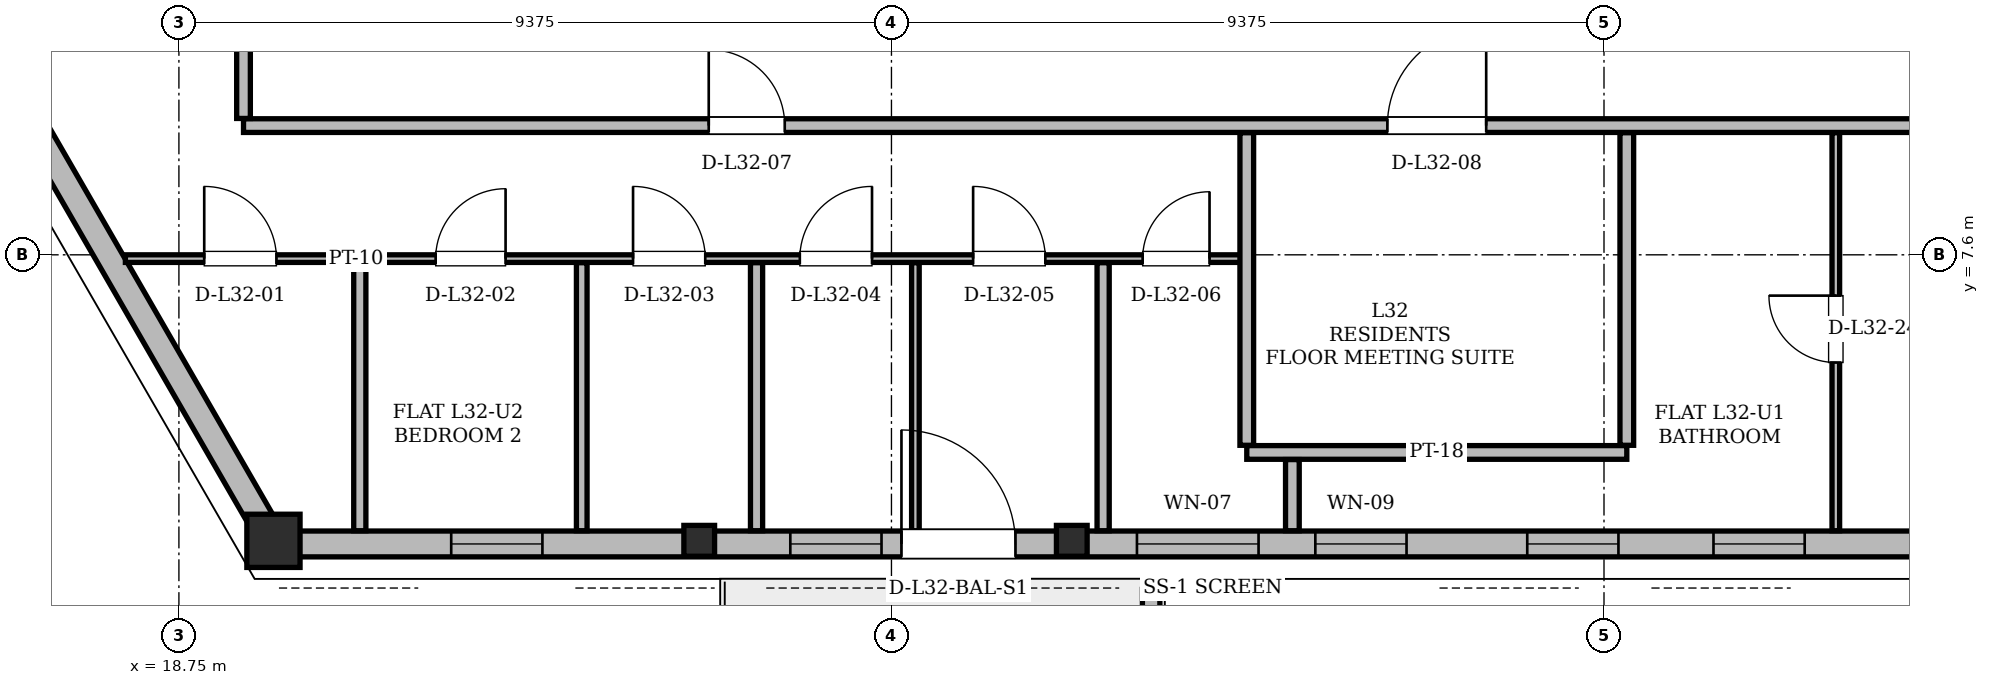
"""IFC4 building model, lengths in metres.
Left out: names, types, materials, properties, quantities, classifications, styles, units other than length and angle.
Written with IfcOpenShell. Run it as: python <this file> out.ifc"""

import sys

from ifc_helpers import new_model, si_unit, direction, frame, frame_2d, origin, origin_2d, place, context, subcontext, project, spatial, polyline, rectangle, hollow_rectangle, i_section, outline, extrude, element, fill, save


model = new_model("IFC4")
c1 = context("Model", 3, precision=1e-05, world=origin(), true_north=direction((0.0, 1.0)))
c2 = subcontext(c1, "Body", "Model", "MODEL_VIEW")
j1 = project(units=[si_unit("LENGTHUNIT", "METRE"), si_unit("PLANEANGLEUNIT", "RADIAN")], contexts=[c1])
p1 = place(None, origin())
s1 = spatial("IfcSite", under=j1, at=p1, CompositionType="ELEMENT")
p2 = place(p1, origin())
s2 = spatial("IfcBuilding", under=s1, at=p2, CompositionType="ELEMENT")
p3 = place(p2, frame((0.0, 0.0, 123.0)))
s3 = spatial("IfcBuildingStorey", under=s2, at=p3, CompositionType="ELEMENT", Elevation=123.0)
p4 = place(p3, frame((20.012, 3.796, 0.004), z_axis=(-0.010194632777, 0.022903941638, 0.999685690065), x_axis=(-0.913587827214, -0.406641466119, 0.0)))
e1 = element("IfcColumn", 1, at=p4, inside=s3, PredefinedType="COLUMN", context=c2, shape_type="SweptSolid", body=[
    extrude(hollow_rectangle(XDim=0.7, YDim=0.7, WallThickness=0.055, at=origin_2d()), origin(), (0.0, 0.0, 1.0), 3.592),
])
for number, where, z_axis, x_axis in (
    (2, (25.608, 3.796, 0.004), (-0.007, 0.023, 1.0), (-0.956, -0.292, 0.0)),
    (3, (30.505, 3.796, 0.004), (-0.004, 0.023, 1.0), (-0.985, -0.175, 0.0)),
):
    element("IfcColumn", number, at=place(p3, frame(where, z_axis=z_axis, x_axis=x_axis)), inside=s3, PredefinedType="COLUMN", context=c2, shape_type="SweptSolid", body=[
        extrude(i_section(OverallWidth=0.404, OverallDepth=0.406, WebThickness=0.027, FlangeThickness=0.044, at=origin_2d()), origin(), (0.0, 0.0, 1.0), 3.592),
    ])
p5 = place(p3, frame((14.636, 13.107, 0.0), z_axis=(0.0, 0.0, 1.0), x_axis=(0.500010095722, -0.866019574938, 0.0)))
e4 = element("IfcWall", 4, at=p5, inside=s3, PredefinedType="SOLIDWALL", context=c2, shape_type="SweptSolid", body=[
    extrude(rectangle(XDim=10.751, YDim=0.34, at=frame_2d((5.375, 0.0))), origin(), (0.0, 0.0, 1.0), 2.578),
])
p6 = place(p3, frame((20.012, 3.796, 0.0), z_axis=(0.0, 0.0, 1.0), x_axis=(1.0, 0.0, 0.0)))
e5 = element("IfcWall", 5, at=p6, inside=s3, PredefinedType="SOLIDWALL", context=c2, shape_type="SweptSolid", body=[
    extrude(rectangle(XDim=34.976, YDim=0.34, at=frame_2d((17.488, 0.0))), origin(), (0.0, 0.0, 1.0), 2.578),
])
p7 = place(p6, frame((8.244, 0.0, 0.0)))
e6 = element("IfcOpeningElement", 6, at=p7, cuts=e5, PredefinedType="OPENING", context=c2, shape_type="SweptSolid", body=[
    extrude(rectangle(XDim=1.5, YDim=2.2, at=frame_2d((0.75, 1.1))), frame((0.0, 0.17, 0.0), z_axis=(0.0, -1.0, 0.0), x_axis=(1.0, 0.0, 0.0)), (0.0, 0.0, 1.0), 0.34),
])
p8 = place(p6, frame((27.106, 0.0, 0.0)))
e7 = element("IfcOpeningElement", 7, at=p8, cuts=e5, PredefinedType="OPENING", context=c2, shape_type="SweptSolid", body=[
    extrude(rectangle(XDim=1.5, YDim=2.2, at=frame_2d((0.75, 1.1))), frame((0.0, 0.17, 0.0), z_axis=(0.0, -1.0, 0.0), x_axis=(1.0, 0.0, 0.0)), (0.0, 0.0, 1.0), 0.34),
])
p9 = place(p6, frame((13.69, 0.0, 0.85)))
e8 = element("IfcOpeningElement", 8, at=p9, cuts=e5, PredefinedType="OPENING", context=c2, shape_type="SweptSolid", body=[
    extrude(rectangle(XDim=1.2, YDim=1.48, at=frame_2d((0.6, 0.74))), frame((0.0, 0.17, 0.0), z_axis=(0.0, -1.0, 0.0), x_axis=(1.0, 0.0, 0.0)), (0.0, 0.0, 1.0), 0.34),
])
p10 = place(p6, frame((16.478, 0.0, 0.85)))
e9 = element("IfcOpeningElement", 9, at=p10, cuts=e5, PredefinedType="OPENING", context=c2, shape_type="SweptSolid", body=[
    extrude(rectangle(XDim=1.2, YDim=1.48, at=frame_2d((0.6, 0.74))), frame((0.0, 0.17, 0.0), z_axis=(0.0, -1.0, 0.0), x_axis=(1.0, 0.0, 0.0)), (0.0, 0.0, 1.0), 0.34),
])
p11 = place(p6, frame((22.323, 0.0, 0.85)))
e10 = element("IfcOpeningElement", 10, at=p11, cuts=e5, PredefinedType="OPENING", context=c2, shape_type="SweptSolid", body=[
    extrude(rectangle(XDim=1.2, YDim=1.48, at=frame_2d((0.6, 0.74))), frame((0.0, 0.17, 0.0), z_axis=(0.0, -1.0, 0.0), x_axis=(1.0, 0.0, 0.0)), (0.0, 0.0, 1.0), 0.34),
])
p12 = place(p6, frame((30.708, 0.0, 0.85)))
e11 = element("IfcOpeningElement", 11, at=p12, cuts=e5, PredefinedType="OPENING", context=c2, shape_type="SweptSolid", body=[
    extrude(rectangle(XDim=2.6, YDim=1.618, at=frame_2d((1.3, 0.809))), frame((0.0, 0.17, 0.0), z_axis=(0.0, -1.0, 0.0), x_axis=(1.0, 0.0, 0.0)), (0.0, 0.0, 1.0), 0.34),
])
p13 = place(p6, frame((18.928, 0.0, 0.85)))
e12 = element("IfcOpeningElement", 12, at=p13, cuts=e5, PredefinedType="OPENING", context=c2, shape_type="SweptSolid", body=[
    extrude(rectangle(XDim=1.2, YDim=1.48, at=frame_2d((0.6, 0.74))), frame((0.0, 0.17, 0.0), z_axis=(0.0, -1.0, 0.0), x_axis=(1.0, 0.0, 0.0)), (0.0, 0.0, 1.0), 0.34),
])
p14 = place(p6, frame((2.32, 0.0, 0.85)))
e13 = element("IfcOpeningElement", 13, at=p14, cuts=e5, PredefinedType="OPENING", context=c2, shape_type="SweptSolid", body=[
    extrude(rectangle(XDim=1.2, YDim=1.48, at=frame_2d((0.6, 0.74))), frame((0.0, 0.17, 0.0), z_axis=(0.0, -1.0, 0.0), x_axis=(1.0, 0.0, 0.0)), (0.0, 0.0, 1.0), 0.34),
])
p15 = place(p6, frame((6.782, 0.0, 0.85)))
e14 = element("IfcOpeningElement", 14, at=p15, cuts=e5, PredefinedType="OPENING", context=c2, shape_type="SweptSolid", body=[
    extrude(rectangle(XDim=1.2, YDim=1.48, at=frame_2d((0.6, 0.74))), frame((0.0, 0.17, 0.0), z_axis=(0.0, -1.0, 0.0), x_axis=(1.0, 0.0, 0.0)), (0.0, 0.0, 1.0), 0.34),
])
p16 = place(p6, frame((11.343, 0.0, 0.85)))
e15 = element("IfcOpeningElement", 15, at=p16, cuts=e5, PredefinedType="OPENING", context=c2, shape_type="SweptSolid", body=[
    extrude(rectangle(XDim=1.6, YDim=1.618, at=frame_2d((0.8, 0.809))), frame((0.0, 0.17, 0.0), z_axis=(0.0, -1.0, 0.0), x_axis=(1.0, 0.0, 0.0)), (0.0, 0.0, 1.0), 0.34),
])
p17 = place(p3, frame((31.542, 3.198, 0.0), z_axis=(0.0, 0.0, 1.0), x_axis=(0.0, -1.0, 0.0)))
e16 = element("IfcWall", 16, at=p17, inside=s3, PredefinedType="PARAPET", context=c2, shape_type="SweptSolid", body=[
    extrude(outline(polyline([(0.0, 0.0), (2.042, 0.0), (2.042, 1.1), (0.0, 1.32), (0.0, 0.0)])), frame((0.0, 0.115, 0.0), z_axis=(0.0, -1.0, 0.0), x_axis=(1.0, 0.0, 0.0)), (0.0, 0.0, 1.0), 0.23),
])
p18 = place(p3, frame((32.8, 5.0, 0.0), z_axis=(0.0, 0.0, 1.0), x_axis=(1.0, 0.0, 0.0)))
e17 = element("IfcWall", 17, at=p18, inside=s3, PredefinedType="PARTITIONING", context=c2, shape_type="SweptSolid", body=[
    extrude(rectangle(XDim=5.0, YDim=0.18, at=frame_2d((2.5, 0.0))), origin(), (0.0, 0.0, 1.0), 3.36),
])
p19 = place(p3, frame((18.046, 7.55, 0.0), z_axis=(0.0, 0.0, 1.0), x_axis=(1.0, 0.0, 0.0)))
e18 = element("IfcWall", 18, at=p19, inside=s3, PredefinedType="PARTITIONING", context=c2, shape_type="SweptSolid", body=[
    extrude(rectangle(XDim=14.804, YDim=0.1, at=frame_2d((7.402, 0.0))), origin(), (0.0, 0.0, 1.0), 2.814),
])
p20 = place(p19, frame((1.037, 0.0, 0.0)))
e19 = element("IfcOpeningElement", 19, at=p20, cuts=e18, PredefinedType="OPENING", context=c2, shape_type="SweptSolid", body=[
    extrude(rectangle(XDim=0.95, YDim=2.1, at=frame_2d((0.475, 1.05))), frame((0.0, 0.05, 0.0), z_axis=(0.0, -1.0, 0.0), x_axis=(1.0, 0.0, 0.0)), (0.0, 0.0, 1.0), 0.1),
])
p21 = place(p19, frame((4.082, 0.0, 0.0)))
e20 = element("IfcOpeningElement", 20, at=p21, cuts=e18, PredefinedType="OPENING", context=c2, shape_type="SweptSolid", body=[
    extrude(rectangle(XDim=0.92, YDim=2.12, at=frame_2d((0.46, 1.06))), frame((0.0, 0.05, 0.0), z_axis=(0.0, -1.0, 0.0), x_axis=(1.0, 0.0, 0.0)), (0.0, 0.0, 1.0), 0.1),
])
p22 = place(p19, frame((6.679, 0.0, 0.0)))
e21 = element("IfcOpeningElement", 21, at=p22, cuts=e18, PredefinedType="OPENING", context=c2, shape_type="SweptSolid", body=[
    extrude(rectangle(XDim=0.95, YDim=2.1, at=frame_2d((0.475, 1.05))), frame((0.0, 0.05, 0.0), z_axis=(0.0, -1.0, 0.0), x_axis=(1.0, 0.0, 0.0)), (0.0, 0.0, 1.0), 0.1),
])
p23 = place(p19, frame((8.873, 0.0, 0.0)))
e22 = element("IfcOpeningElement", 22, at=p23, cuts=e18, PredefinedType="OPENING", context=c2, shape_type="SweptSolid", body=[
    extrude(rectangle(XDim=0.95, YDim=2.1, at=frame_2d((0.475, 1.05))), frame((0.0, 0.05, 0.0), z_axis=(0.0, -1.0, 0.0), x_axis=(1.0, 0.0, 0.0)), (0.0, 0.0, 1.0), 0.1),
])
p24 = place(p19, frame((11.154, 0.0, 0.0)))
e23 = element("IfcOpeningElement", 23, at=p24, cuts=e18, PredefinedType="OPENING", context=c2, shape_type="SweptSolid", body=[
    extrude(rectangle(XDim=0.95, YDim=2.1, at=frame_2d((0.475, 1.05))), frame((0.0, 0.05, 0.0), z_axis=(0.0, -1.0, 0.0), x_axis=(1.0, 0.0, 0.0)), (0.0, 0.0, 1.0), 0.1),
])
p25 = place(p19, frame((13.384, 0.0, 0.0)))
e24 = element("IfcOpeningElement", 24, at=p25, cuts=e18, PredefinedType="OPENING", context=c2, shape_type="SweptSolid", body=[
    extrude(rectangle(XDim=0.88, YDim=2.08, at=frame_2d((0.44, 1.04))), frame((0.0, 0.05, 0.0), z_axis=(0.0, -1.0, 0.0), x_axis=(1.0, 0.0, 0.0)), (0.0, 0.0, 1.0), 0.1),
])
p26 = place(p3, frame((19.6, 9.3, 0.0), z_axis=(0.0, 0.0, 1.0), x_axis=(1.0, 0.0, 0.0)))
e25 = element("IfcWall", 25, at=p26, inside=s3, PredefinedType="PARTITIONING", context=c2, shape_type="SweptSolid", body=[
    extrude(rectangle(XDim=30.4, YDim=0.18, at=frame_2d((15.2, 0.0))), origin(), (0.0, 0.0, 1.0), 2.814),
])
p27 = place(p26, frame((6.121, 0.0, 0.0)))
e26 = element("IfcOpeningElement", 26, at=p27, cuts=e25, PredefinedType="OPENING", context=c2, shape_type="SweptSolid", body=[
    extrude(rectangle(XDim=1.0, YDim=2.18, at=frame_2d((0.5, 1.09))), frame((0.0, 0.09, 0.0), z_axis=(0.0, -1.0, 0.0), x_axis=(1.0, 0.0, 0.0)), (0.0, 0.0, 1.0), 0.18),
])
p28 = place(p26, frame((15.05, 0.0, 0.0)))
e27 = element("IfcOpeningElement", 27, at=p28, cuts=e25, PredefinedType="OPENING", context=c2, shape_type="SweptSolid", body=[
    extrude(rectangle(XDim=1.3, YDim=2.2, at=frame_2d((0.65, 1.1))), frame((0.0, 0.09, 0.0), z_axis=(0.0, -1.0, 0.0), x_axis=(1.0, 0.0, 0.0)), (0.0, 0.0, 1.0), 0.18),
])
p29 = place(p26, frame((24.633, 0.0, 0.0)))
e28 = element("IfcOpeningElement", 28, at=p29, cuts=e25, PredefinedType="OPENING", context=c2, shape_type="SweptSolid", body=[
    extrude(rectangle(XDim=1.0, YDim=2.18, at=frame_2d((0.5, 1.09))), frame((0.0, 0.09, 0.0), z_axis=(0.0, -1.0, 0.0), x_axis=(1.0, 0.0, 0.0)), (0.0, 0.0, 1.0), 0.18),
])
p30 = place(p3, frame((19.6, 9.394, 0.0), z_axis=(0.0, 0.0, 1.0), x_axis=(0.0, 1.0, 0.0)))
e29 = element("IfcWall", 29, at=p30, inside=s3, PredefinedType="PARTITIONING", context=c2, shape_type="SweptSolid", body=[
    extrude(rectangle(XDim=1.462, YDim=0.18, at=frame_2d((0.731, 0.0))), origin(), (0.0, 0.0, 1.0), 3.36),
])
p31 = place(p3, frame((21.13, 3.97, 0.0), z_axis=(0.0, 0.0, 1.0), x_axis=(0.0, 1.0, 0.0)))
e30 = element("IfcWall", 30, at=p31, inside=s3, PredefinedType="PARTITIONING", context=c2, shape_type="SweptSolid", body=[
    extrude(rectangle(XDim=3.526, YDim=0.16, at=frame_2d((1.763, 0.0))), origin(), (0.0, 0.0, 1.0), 2.814),
])
p32 = place(p3, frame((24.05, 3.97, 0.0), z_axis=(0.0, 0.0, 1.0), x_axis=(0.0, 1.0, 0.0)))
e31 = element("IfcWall", 31, at=p32, inside=s3, PredefinedType="PARTITIONING", context=c2, shape_type="SweptSolid", body=[
    extrude(rectangle(XDim=3.526, YDim=0.14, at=frame_2d((1.763, 0.0))), origin(), (0.0, 0.0, 1.0), 2.814),
])
p33 = place(p3, frame((26.35, 3.97, 0.0), z_axis=(0.0, 0.0, 1.0), x_axis=(0.0, 1.0, 0.0)))
e32 = element("IfcWall", 32, at=p33, inside=s3, PredefinedType="PARTITIONING", context=c2, shape_type="SweptSolid", body=[
    extrude(rectangle(XDim=3.526, YDim=0.16, at=frame_2d((1.763, 0.0))), origin(), (0.0, 0.0, 1.0), 2.946),
])
p34 = place(p3, frame((28.44, 3.97, 0.0), z_axis=(0.0, 0.0, 1.0), x_axis=(0.0, 1.0, 0.0)))
e33 = element("IfcWall", 33, at=p34, inside=s3, PredefinedType="PARTITIONING", context=c2, shape_type="SweptSolid", body=[
    extrude(rectangle(XDim=3.526, YDim=0.1, at=frame_2d((1.763, 0.0))), origin(), (0.0, 0.0, 1.0), 3.36),
])
p35 = place(p3, frame((30.91, 3.97, 0.0), z_axis=(0.0, 0.0, 1.0), x_axis=(0.0, 1.0, 0.0)))
e34 = element("IfcWall", 34, at=p35, inside=s3, PredefinedType="PARTITIONING", context=c2, shape_type="SweptSolid", body=[
    extrude(rectangle(XDim=3.526, YDim=0.16, at=frame_2d((1.763, 0.0))), origin(), (0.0, 0.0, 1.0), 2.946),
])
p36 = place(p3, frame((32.8, 5.094, 0.0), z_axis=(0.0, 0.0, 1.0), x_axis=(0.0, 1.0, 0.0)))
e35 = element("IfcWall", 35, at=p36, inside=s3, PredefinedType="PARTITIONING", context=c2, shape_type="SweptSolid", body=[
    extrude(rectangle(XDim=4.112, YDim=0.18, at=frame_2d((2.056, 0.0))), origin(), (0.0, 0.0, 1.0), 2.946),
])
p37 = place(p3, frame((33.4, 3.97, 0.0), z_axis=(0.0, 0.0, 1.0), x_axis=(0.0, 1.0, 0.0)))
e36 = element("IfcWall", 36, at=p37, inside=s3, PredefinedType="PARTITIONING", context=c2, shape_type="SweptSolid", body=[
    extrude(rectangle(XDim=0.936, YDim=0.18, at=frame_2d((0.468, 0.0))), origin(), (0.0, 0.0, 1.0), 3.36),
])
p38 = place(p3, frame((37.8, 5.094, 0.0), z_axis=(0.0, 0.0, 1.0), x_axis=(0.0, 1.0, 0.0)))
e37 = element("IfcWall", 37, at=p38, inside=s3, PredefinedType="PARTITIONING", context=c2, shape_type="SweptSolid", body=[
    extrude(rectangle(XDim=4.112, YDim=0.18, at=frame_2d((2.056, 0.0))), origin(), (0.0, 0.0, 1.0), 3.36),
])
p39 = place(p3, frame((40.55, 3.97, 0.0), z_axis=(0.0, 0.0, 1.0), x_axis=(0.0, 1.0, 0.0)))
e38 = element("IfcWall", 38, at=p39, inside=s3, PredefinedType="PARTITIONING", context=c2, shape_type="SweptSolid", body=[
    extrude(rectangle(XDim=5.236, YDim=0.1, at=frame_2d((2.618, 0.0))), origin(), (0.0, 0.0, 1.0), 3.36),
])
p40 = place(p39, frame((2.213, 0.0, 0.0)))
e39 = element("IfcOpeningElement", 39, at=p40, cuts=e38, PredefinedType="OPENING", context=c2, shape_type="SweptSolid", body=[
    extrude(rectangle(XDim=0.88, YDim=2.08, at=frame_2d((0.44, 1.04))), frame((0.0, 0.05, 0.0), z_axis=(0.0, -1.0, 0.0), x_axis=(1.0, 0.0, 0.0)), (0.0, 0.0, 1.0), 0.1),
])
p41 = place(p7, origin())
e40 = element("IfcDoor", 40, at=p41, inside=s3, OperationType="SINGLE_SWING_LEFT", PredefinedType="DOOR", context=c2, shape_type="SweptSolid", body=[
    extrude(rectangle(XDim=1.5, YDim=2.2, at=frame_2d((0.75, 1.1))), frame((0.0, 0.025, 0.0), z_axis=(0.0, -1.0, 0.0), x_axis=(1.0, 0.0, 0.0)), (0.0, 0.0, 1.0), 0.05),
])
fill(e6, e40)
p42 = place(p9, origin())
e41 = element("IfcWindow", 41, at=p42, inside=s3, PartitioningType="SINGLE_PANEL", PredefinedType="WINDOW", context=c2, shape_type="SweptSolid", body=[
    extrude(rectangle(XDim=1.2, YDim=1.48, at=frame_2d((0.6, 0.74))), frame((0.0, 0.03, 0.0), z_axis=(0.0, -1.0, 0.0), x_axis=(1.0, 0.0, 0.0)), (0.0, 0.0, 1.0), 0.06),
])
fill(e8, e41)
p43 = place(p10, origin())
e42 = element("IfcWindow", 42, at=p43, inside=s3, PartitioningType="SINGLE_PANEL", PredefinedType="WINDOW", context=c2, shape_type="SweptSolid", body=[
    extrude(rectangle(XDim=1.2, YDim=1.48, at=frame_2d((0.6, 0.74))), frame((0.0, 0.03, 0.0), z_axis=(0.0, -1.0, 0.0), x_axis=(1.0, 0.0, 0.0)), (0.0, 0.0, 1.0), 0.06),
])
fill(e9, e42)
p44 = place(p13, origin())
e43 = element("IfcWindow", 43, at=p44, inside=s3, PartitioningType="SINGLE_PANEL", PredefinedType="WINDOW", context=c2, shape_type="SweptSolid", body=[
    extrude(rectangle(XDim=1.2, YDim=1.48, at=frame_2d((0.6, 0.74))), frame((0.0, 0.03, 0.0), z_axis=(0.0, -1.0, 0.0), x_axis=(1.0, 0.0, 0.0)), (0.0, 0.0, 1.0), 0.06),
])
fill(e12, e43)
p45 = place(p14, origin())
e44 = element("IfcWindow", 44, at=p45, inside=s3, PartitioningType="SINGLE_PANEL", PredefinedType="WINDOW", context=c2, shape_type="SweptSolid", body=[
    extrude(rectangle(XDim=1.2, YDim=1.48, at=frame_2d((0.6, 0.74))), frame((0.0, 0.03, 0.0), z_axis=(0.0, -1.0, 0.0), x_axis=(1.0, 0.0, 0.0)), (0.0, 0.0, 1.0), 0.06),
])
fill(e13, e44)
p46 = place(p15, origin())
e45 = element("IfcWindow", 45, at=p46, inside=s3, PartitioningType="SINGLE_PANEL", PredefinedType="WINDOW", context=c2, shape_type="SweptSolid", body=[
    extrude(rectangle(XDim=1.2, YDim=1.48, at=frame_2d((0.6, 0.74))), frame((0.0, 0.03, 0.0), z_axis=(0.0, -1.0, 0.0), x_axis=(1.0, 0.0, 0.0)), (0.0, 0.0, 1.0), 0.06),
])
fill(e14, e45)
p47 = place(p16, origin())
e46 = element("IfcWindow", 46, at=p47, inside=s3, PartitioningType="SINGLE_PANEL", PredefinedType="WINDOW", context=c2, shape_type="SweptSolid", body=[
    extrude(rectangle(XDim=1.6, YDim=1.618, at=frame_2d((0.8, 0.809))), frame((0.0, 0.03, 0.0), z_axis=(0.0, -1.0, 0.0), x_axis=(1.0, 0.0, 0.0)), (0.0, 0.0, 1.0), 0.06),
])
fill(e15, e46)
p48 = place(p20, origin())
e47 = element("IfcDoor", 47, at=p48, inside=s3, OperationType="SINGLE_SWING_LEFT", PredefinedType="DOOR", context=c2, shape_type="SweptSolid", body=[
    extrude(rectangle(XDim=0.95, YDim=2.1, at=frame_2d((0.475, 1.05))), frame((0.0, 0.025, 0.0), z_axis=(0.0, -1.0, 0.0), x_axis=(1.0, 0.0, 0.0)), (0.0, 0.0, 1.0), 0.05),
])
fill(e19, e47)
p49 = place(p21, origin())
e48 = element("IfcDoor", 48, at=p49, inside=s3, OperationType="SINGLE_SWING_RIGHT", PredefinedType="DOOR", context=c2, shape_type="SweptSolid", body=[
    extrude(rectangle(XDim=0.92, YDim=2.12, at=frame_2d((0.46, 1.06))), frame((0.0, 0.025, 0.0), z_axis=(0.0, -1.0, 0.0), x_axis=(1.0, 0.0, 0.0)), (0.0, 0.0, 1.0), 0.05),
])
fill(e20, e48)
p50 = place(p22, origin())
e49 = element("IfcDoor", 49, at=p50, inside=s3, OperationType="SINGLE_SWING_LEFT", PredefinedType="DOOR", context=c2, shape_type="SweptSolid", body=[
    extrude(rectangle(XDim=0.95, YDim=2.1, at=frame_2d((0.475, 1.05))), frame((0.0, 0.025, 0.0), z_axis=(0.0, -1.0, 0.0), x_axis=(1.0, 0.0, 0.0)), (0.0, 0.0, 1.0), 0.05),
])
fill(e21, e49)
p51 = place(p23, origin())
e50 = element("IfcDoor", 50, at=p51, inside=s3, OperationType="SINGLE_SWING_RIGHT", PredefinedType="DOOR", context=c2, shape_type="SweptSolid", body=[
    extrude(rectangle(XDim=0.95, YDim=2.1, at=frame_2d((0.475, 1.05))), frame((0.0, 0.025, 0.0), z_axis=(0.0, -1.0, 0.0), x_axis=(1.0, 0.0, 0.0)), (0.0, 0.0, 1.0), 0.05),
])
fill(e22, e50)
p52 = place(p24, origin())
e51 = element("IfcDoor", 51, at=p52, inside=s3, OperationType="SINGLE_SWING_LEFT", PredefinedType="DOOR", context=c2, shape_type="SweptSolid", body=[
    extrude(rectangle(XDim=0.95, YDim=2.1, at=frame_2d((0.475, 1.05))), frame((0.0, 0.025, 0.0), z_axis=(0.0, -1.0, 0.0), x_axis=(1.0, 0.0, 0.0)), (0.0, 0.0, 1.0), 0.05),
])
fill(e23, e51)
p53 = place(p25, origin())
e52 = element("IfcDoor", 52, at=p53, inside=s3, OperationType="SINGLE_SWING_RIGHT", PredefinedType="DOOR", context=c2, shape_type="SweptSolid", body=[
    extrude(rectangle(XDim=0.88, YDim=2.08, at=frame_2d((0.44, 1.04))), frame((0.0, 0.025, 0.0), z_axis=(0.0, -1.0, 0.0), x_axis=(1.0, 0.0, 0.0)), (0.0, 0.0, 1.0), 0.05),
])
fill(e24, e52)
p54 = place(p27, origin())
e53 = element("IfcDoor", 53, at=p54, inside=s3, OperationType="SINGLE_SWING_LEFT", PredefinedType="DOOR", context=c2, shape_type="SweptSolid", body=[
    extrude(rectangle(XDim=1.0, YDim=2.18, at=frame_2d((0.5, 1.09))), frame((0.0, 0.025, 0.0), z_axis=(0.0, -1.0, 0.0), x_axis=(1.0, 0.0, 0.0)), (0.0, 0.0, 1.0), 0.05),
])
fill(e26, e53)
p55 = place(p28, origin())
e54 = element("IfcDoor", 54, at=p55, inside=s3, OperationType="SINGLE_SWING_RIGHT", PredefinedType="DOOR", context=c2, shape_type="SweptSolid", body=[
    extrude(rectangle(XDim=1.3, YDim=2.2, at=frame_2d((0.65, 1.1))), frame((0.0, 0.025, 0.0), z_axis=(0.0, -1.0, 0.0), x_axis=(1.0, 0.0, 0.0)), (0.0, 0.0, 1.0), 0.05),
])
fill(e27, e54)
p56 = place(p40, origin())
e55 = element("IfcDoor", 55, at=p56, inside=s3, OperationType="SINGLE_SWING_RIGHT", PredefinedType="DOOR", context=c2, shape_type="SweptSolid", body=[
    extrude(rectangle(XDim=0.88, YDim=2.08, at=frame_2d((0.44, 1.04))), frame((0.0, 0.025, 0.0), z_axis=(0.0, -1.0, 0.0), x_axis=(1.0, 0.0, 0.0)), (0.0, 0.0, 1.0), 0.05),
])
fill(e39, e55)
save(model, sys.argv[1])
